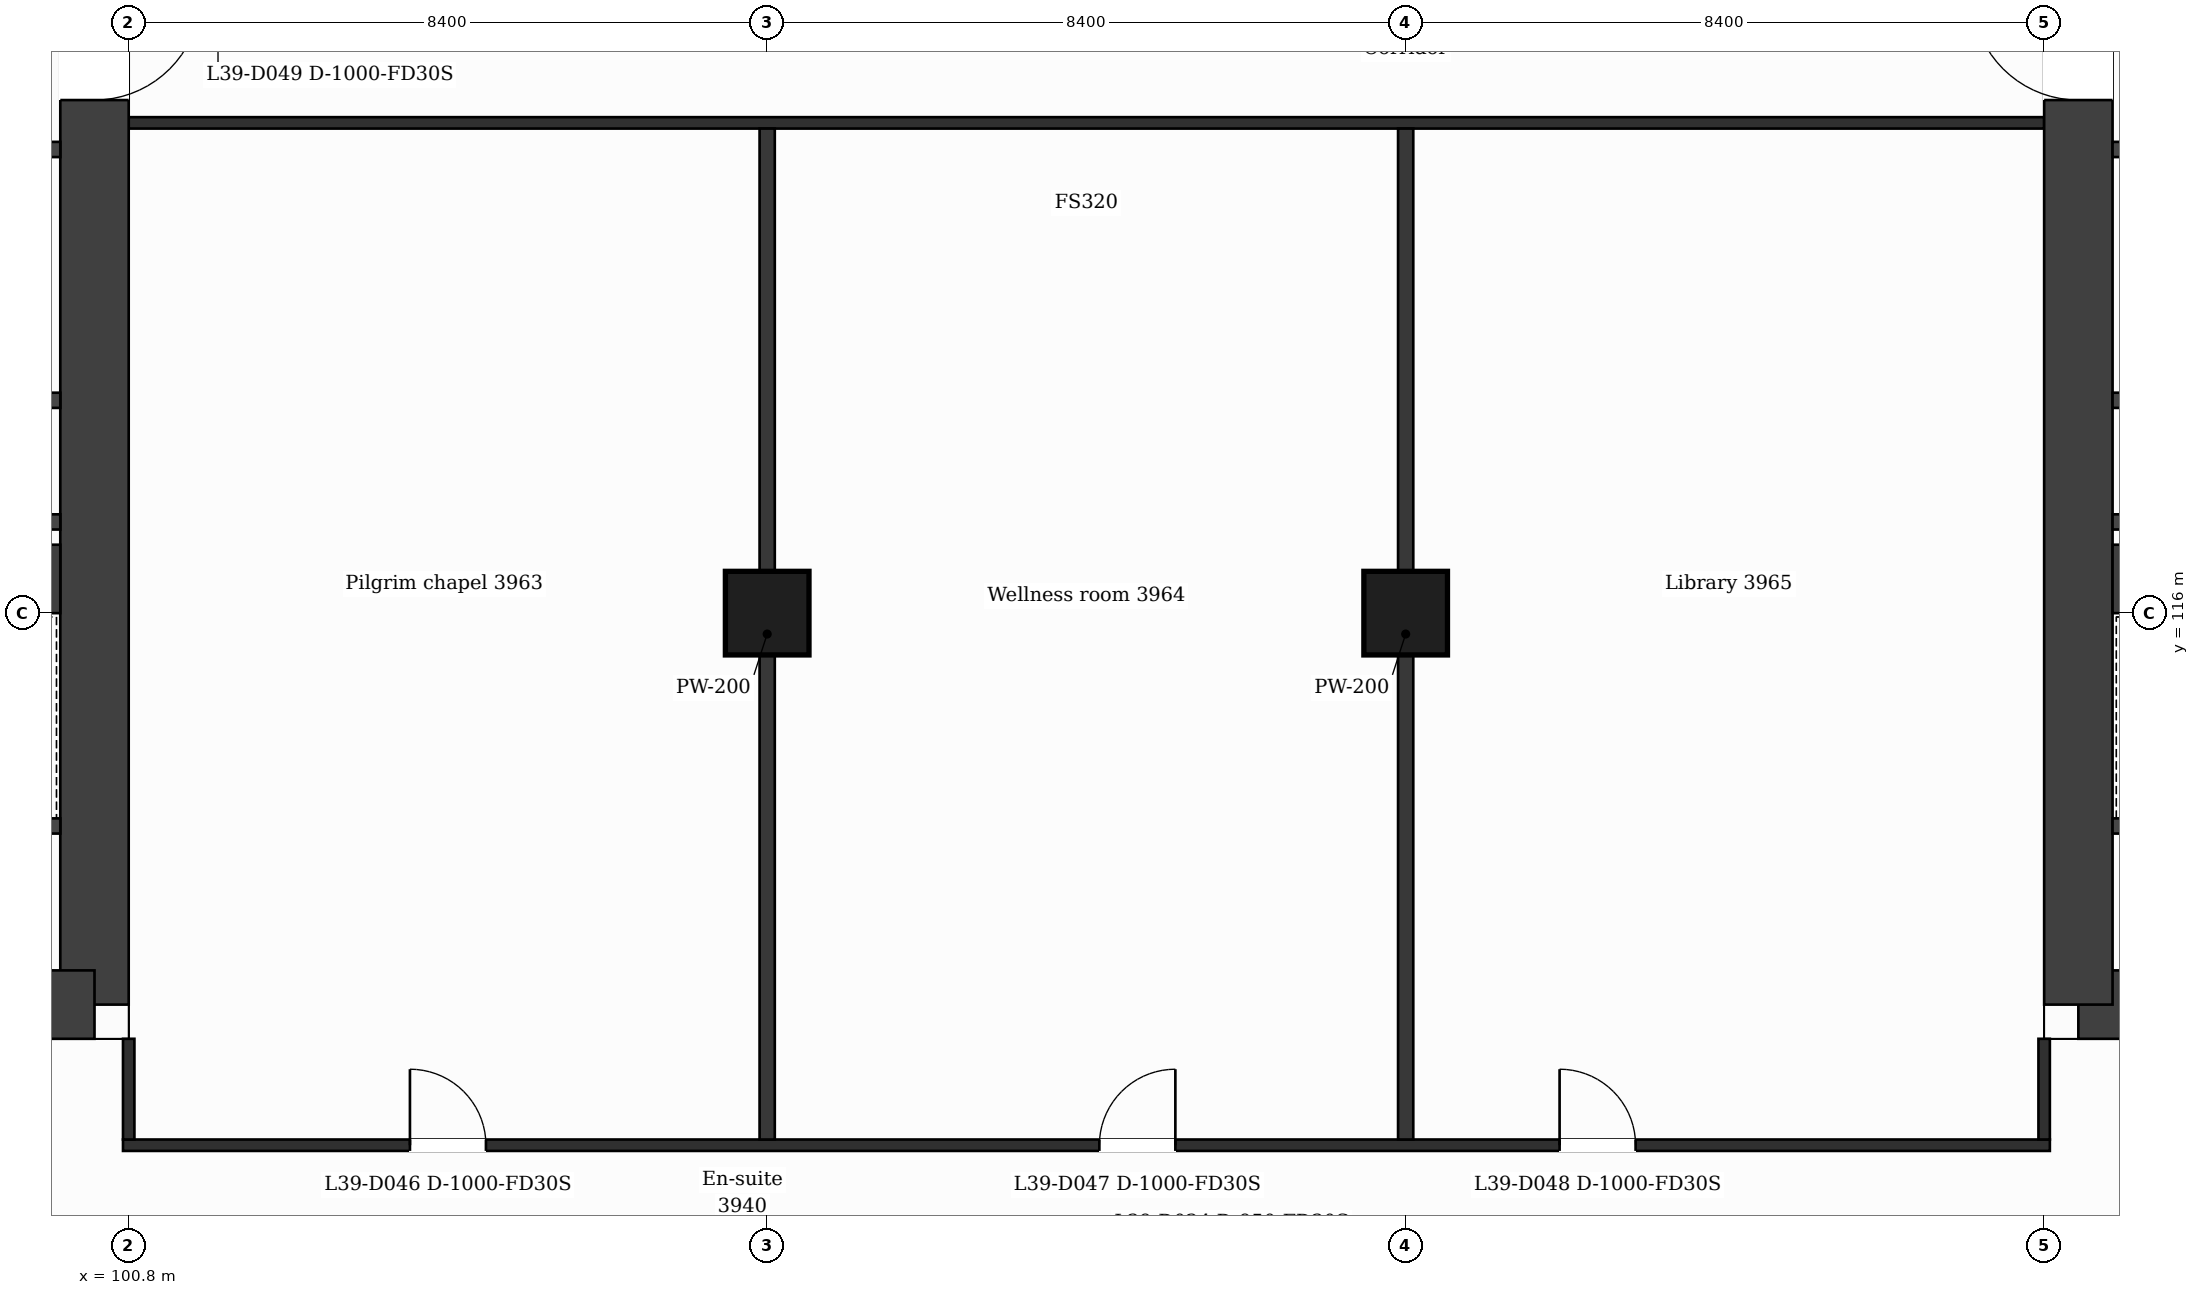
"""IFC4 building model, lengths in metres.
Left out: names, types, materials, properties, quantities, classifications, styles, units other than length and angle.
Written with IfcOpenShell. Run it as: python <this file> out.ifc"""

import sys

from ifc_helpers import new_model, si_unit, direction, frame, frame_2d, origin, origin_2d, place, context, subcontext, project, spatial, rectangle, extrude, element, fill, save


model = new_model("IFC4")
c1 = context("Model", 3, precision=1e-05, world=origin(), true_north=direction((0.0, 1.0)))
c2 = subcontext(c1, "Body", "Model", "MODEL_VIEW")
j1 = project(units=[si_unit("LENGTHUNIT", "METRE"), si_unit("PLANEANGLEUNIT", "RADIAN")], contexts=[c1])
p1 = place(None, origin())
s1 = spatial("IfcSite", under=j1, at=p1, CompositionType="ELEMENT")
p2 = place(p1, origin())
s2 = spatial("IfcBuilding", under=s1, at=p2, CompositionType="ELEMENT")
p3 = place(p2, frame((0.0, 0.0, 166.3)))
s3 = spatial("IfcBuildingStorey", under=s2, at=p3, CompositionType="ELEMENT", Elevation=166.3)
p4 = place(p3, frame((100.35, 131.95, 0.0), z_axis=(0.0, 0.0, 1.0), x_axis=(0.0, -1.0, 0.0)))
e1 = element("IfcWall", 1, at=p4, inside=s3, PredefinedType="SHEAR", context=c2, shape_type="SweptSolid", body=[
    extrude(rectangle(XDim=21.1, YDim=0.9, at=frame_2d((10.55, 0.0))), origin(), (0.0, 0.0, 1.0), 3.7),
])
p5 = place(p4, frame((7.8, 0.0, 0.0)))
e2 = element("IfcOpeningElement", 2, at=p5, cuts=e1, PredefinedType="OPENING", context=c2, shape_type="SweptSolid", body=[
    extrude(rectangle(XDim=1.4, YDim=2.1, at=frame_2d((0.7, 1.05))), frame((0.0, 0.46, 0.0), z_axis=(0.0, -1.0, 0.0), x_axis=(1.0, 0.0, 0.0)), (0.0, 0.0, 1.0), 0.92),
])
p6 = place(p3, frame((100.35, 110.85, 0.0), z_axis=(0.0, 0.0, 1.0), x_axis=(-1.0, 0.0, 0.0)))
e3 = element("IfcWall", 3, at=p6, inside=s3, PredefinedType="SHEAR", context=c2, shape_type="SweptSolid", body=[
    extrude(rectangle(XDim=14.166, YDim=0.9, at=frame_2d((7.083, 0.0))), origin(), (0.0, 0.0, 1.0), 3.7),
])
p7 = place(p6, frame((5.855, 0.0, 0.0)))
e4 = element("IfcOpeningElement", 4, at=p7, cuts=e3, PredefinedType="OPENING", context=c2, shape_type="SweptSolid", body=[
    extrude(rectangle(XDim=1.4, YDim=2.1, at=frame_2d((0.7, 1.05))), frame((0.0, 0.46, 0.0), z_axis=(0.0, -1.0, 0.0), x_axis=(1.0, 0.0, 0.0)), (0.0, 0.0, 1.0), 0.92),
])
p8 = place(p3, frame((94.8, 116.45, 0.0), z_axis=(0.0, 0.0, 1.0), x_axis=(1.0, 0.0, 0.0)))
e5 = element("IfcWall", 5, at=p8, inside=s3, PredefinedType="SHEAR", context=c2, shape_type="SweptSolid", body=[
    extrude(rectangle(XDim=5.1, YDim=0.9, at=frame_2d((2.55, 0.0))), origin(), (0.0, 0.0, 1.0), 3.7),
])
p9 = place(p3, frame((140.616, 110.85, 0.0), z_axis=(0.0, 0.0, 1.0), x_axis=(-1.0, 0.0, 0.0)))
e6 = element("IfcWall", 6, at=p9, inside=s3, PredefinedType="SHEAR", context=c2, shape_type="SweptSolid", body=[
    extrude(rectangle(XDim=14.166, YDim=0.9, at=frame_2d((7.083, 0.0))), origin(), (0.0, 0.0, 1.0), 3.7),
])
p10 = place(p9, frame((6.911, 0.0, 0.0)))
e7 = element("IfcOpeningElement", 7, at=p10, cuts=e6, PredefinedType="OPENING", context=c2, shape_type="SweptSolid", body=[
    extrude(rectangle(XDim=1.4, YDim=2.1, at=frame_2d((0.7, 1.05))), frame((0.0, 0.46, 0.0), z_axis=(0.0, -1.0, 0.0), x_axis=(1.0, 0.0, 0.0)), (0.0, 0.0, 1.0), 0.92),
])
p11 = place(p3, frame((126.45, 110.85, 0.0), z_axis=(0.0, 0.0, 1.0), x_axis=(0.0, 1.0, 0.0)))
e8 = element("IfcWall", 8, at=p11, inside=s3, PredefinedType="SHEAR", context=c2, shape_type="SweptSolid", body=[
    extrude(rectangle(XDim=21.1, YDim=0.9, at=frame_2d((10.55, 0.0))), origin(), (0.0, 0.0, 1.0), 3.7),
])
p12 = place(p11, frame((11.9, 0.0, 0.0)))
e9 = element("IfcOpeningElement", 9, at=p12, cuts=e8, PredefinedType="OPENING", context=c2, shape_type="SweptSolid", body=[
    extrude(rectangle(XDim=1.4, YDim=2.1, at=frame_2d((0.7, 1.05))), frame((0.0, 0.46, 0.0), z_axis=(0.0, -1.0, 0.0), x_axis=(1.0, 0.0, 0.0)), (0.0, 0.0, 1.0), 0.92),
])
p13 = place(p3, frame((126.9, 116.45, 0.0), z_axis=(0.0, 0.0, 1.0), x_axis=(1.0, 0.0, 0.0)))
e10 = element("IfcWall", 10, at=p13, inside=s3, PredefinedType="SHEAR", context=c2, shape_type="SweptSolid", body=[
    extrude(rectangle(XDim=5.1, YDim=0.9, at=frame_2d((2.55, 0.0))), origin(), (0.0, 0.0, 1.0), 3.7),
])
for number, where, z_axis, x_axis in (
    (11, (109.2, 116.0, 0.0), (0.0, 0.0, 1.0), (1.0, 0.0, 0.0)),
    (12, (117.6, 116.0, 0.0), (0.0, 0.0, 1.0), (1.0, 0.0, 0.0)),
):
    element("IfcColumn", number, at=place(p3, frame(where, z_axis=z_axis, x_axis=x_axis)), inside=s3, PredefinedType="COLUMN", context=c2, shape_type="SweptSolid", body=[
        extrude(rectangle(XDim=1.1, YDim=1.1, at=origin_2d()), origin(), (0.0, 0.0, 1.0), 3.7),
    ])
p14 = place(p3, frame((100.725, 109.0, 0.0), z_axis=(0.0, 0.0, 1.0), x_axis=(1.0, 0.0, 0.0)))
e13 = element("IfcWall", 13, at=p14, inside=s3, PredefinedType="PARTITIONING", context=c2, shape_type="SweptSolid", body=[
    extrude(rectangle(XDim=25.35, YDim=0.15, at=frame_2d((12.675, 0.0))), origin(), (0.0, 0.0, 1.0), 3.38),
])
p15 = place(p14, frame((3.775, 0.0, 0.0)))
e14 = element("IfcOpeningElement", 14, at=p15, cuts=e13, PredefinedType="OPENING", context=c2, shape_type="SweptSolid", body=[
    extrude(rectangle(XDim=1.0, YDim=2.1, at=frame_2d((0.5, 1.05))), frame((0.0, 0.085, 0.0), z_axis=(0.0, -1.0, 0.0), x_axis=(1.0, 0.0, 0.0)), (0.0, 0.0, 1.0), 0.17),
])
p16 = place(p14, frame((12.845, 0.0, 0.0)))
e15 = element("IfcOpeningElement", 15, at=p16, cuts=e13, PredefinedType="OPENING", context=c2, shape_type="SweptSolid", body=[
    extrude(rectangle(XDim=1.0, YDim=2.1, at=frame_2d((0.5, 1.05))), frame((0.0, 0.085, 0.0), z_axis=(0.0, -1.0, 0.0), x_axis=(1.0, 0.0, 0.0)), (0.0, 0.0, 1.0), 0.17),
])
p17 = place(p14, frame((18.9, 0.0, 0.0)))
e16 = element("IfcOpeningElement", 16, at=p17, cuts=e13, PredefinedType="OPENING", context=c2, shape_type="SweptSolid", body=[
    extrude(rectangle(XDim=1.0, YDim=2.1, at=frame_2d((0.5, 1.05))), frame((0.0, 0.085, 0.0), z_axis=(0.0, -1.0, 0.0), x_axis=(1.0, 0.0, 0.0)), (0.0, 0.0, 1.0), 0.17),
])
p18 = place(p3, frame((95.127, 113.2, 0.0), z_axis=(0.0, 0.0, 1.0), x_axis=(1.0, 0.0, 0.0)))
e17 = element("IfcWall", 17, at=p18, inside=s3, PredefinedType="PARTITIONING", context=c2, shape_type="SweptSolid", body=[
    extrude(rectangle(XDim=4.773, YDim=0.2, at=frame_2d((2.386, 0.0))), origin(), (0.0, 0.0, 1.0), 3.38),
])
p19 = place(p18, frame((2.921, 0.0, 0.0)))
e18 = element("IfcOpeningElement", 18, at=p19, cuts=e17, PredefinedType="OPENING", context=c2, shape_type="SweptSolid", body=[
    extrude(rectangle(XDim=1.1, YDim=2.1, at=frame_2d((0.55, 1.05))), frame((0.0, 0.11, 0.0), z_axis=(0.0, -1.0, 0.0), x_axis=(1.0, 0.0, 0.0)), (0.0, 0.0, 1.0), 0.22),
])
p20 = place(p3, frame((126.9, 113.2, 0.0), z_axis=(0.0, 0.0, 1.0), x_axis=(1.0, 0.0, 0.0)))
e19 = element("IfcWall", 19, at=p20, inside=s3, PredefinedType="PARTITIONING", context=c2, shape_type="SweptSolid", body=[
    extrude(rectangle(XDim=4.773, YDim=0.2, at=frame_2d((2.387, 0.0))), origin(), (0.0, 0.0, 1.0), 3.38),
])
p21 = place(p20, frame((0.618, 0.0, 0.0)))
e20 = element("IfcOpeningElement", 20, at=p21, cuts=e19, PredefinedType="OPENING", context=c2, shape_type="SweptSolid", body=[
    extrude(rectangle(XDim=1.1, YDim=2.1, at=frame_2d((0.55, 1.05))), frame((0.0, 0.11, 0.0), z_axis=(0.0, -1.0, 0.0), x_axis=(1.0, 0.0, 0.0)), (0.0, 0.0, 1.0), 0.22),
])
p22 = place(p3, frame((95.227, 117.2, 0.0), z_axis=(0.0, 0.0, 1.0), x_axis=(1.0, 0.0, 0.0)))
e21 = element("IfcWall", 21, at=p22, inside=s3, PredefinedType="PARTITIONING", context=c2, shape_type="SweptSolid", body=[
    extrude(rectangle(XDim=4.673, YDim=0.2, at=frame_2d((2.336, 0.0))), origin(), (0.0, 0.0, 1.0), 3.38),
])
p23 = place(p3, frame((126.9, 117.2, 0.0), z_axis=(0.0, 0.0, 1.0), x_axis=(1.0, 0.0, 0.0)))
e22 = element("IfcWall", 22, at=p23, inside=s3, PredefinedType="PARTITIONING", context=c2, shape_type="SweptSolid", body=[
    extrude(rectangle(XDim=4.673, YDim=0.2, at=frame_2d((2.336, 0.0))), origin(), (0.0, 0.0, 1.0), 3.38),
])
p24 = place(p3, frame((95.227, 118.8, 0.0), z_axis=(0.0, 0.0, 1.0), x_axis=(1.0, 0.0, 0.0)))
e23 = element("IfcWall", 23, at=p24, inside=s3, PredefinedType="PARTITIONING", context=c2, shape_type="SweptSolid", body=[
    extrude(rectangle(XDim=4.673, YDim=0.2, at=frame_2d((2.336, 0.0))), origin(), (0.0, 0.0, 1.0), 3.38),
])
p25 = place(p3, frame((126.9, 118.8, 0.0), z_axis=(0.0, 0.0, 1.0), x_axis=(1.0, 0.0, 0.0)))
e24 = element("IfcWall", 24, at=p25, inside=s3, PredefinedType="PARTITIONING", context=c2, shape_type="SweptSolid", body=[
    extrude(rectangle(XDim=4.673, YDim=0.2, at=frame_2d((2.336, 0.0))), origin(), (0.0, 0.0, 1.0), 3.38),
])
p26 = place(p3, frame((95.227, 122.1, 0.0), z_axis=(0.0, 0.0, 1.0), x_axis=(1.0, 0.0, 0.0)))
e25 = element("IfcWall", 25, at=p26, inside=s3, PredefinedType="PARTITIONING", context=c2, shape_type="SweptSolid", body=[
    extrude(rectangle(XDim=4.673, YDim=0.2, at=frame_2d((2.336, 0.0))), origin(), (0.0, 0.0, 1.0), 3.38),
])
p27 = place(p26, frame((2.655, 0.0, 0.0)))
e26 = element("IfcOpeningElement", 26, at=p27, cuts=e25, PredefinedType="OPENING", context=c2, shape_type="SweptSolid", body=[
    extrude(rectangle(XDim=0.9, YDim=2.1, at=frame_2d((0.45, 1.05))), frame((0.0, 0.11, 0.0), z_axis=(0.0, -1.0, 0.0), x_axis=(1.0, 0.0, 0.0)), (0.0, 0.0, 1.0), 0.22),
])
p28 = place(p3, frame((126.9, 122.1, 0.0), z_axis=(0.0, 0.0, 1.0), x_axis=(1.0, 0.0, 0.0)))
e27 = element("IfcWall", 27, at=p28, inside=s3, PredefinedType="PARTITIONING", context=c2, shape_type="SweptSolid", body=[
    extrude(rectangle(XDim=4.673, YDim=0.2, at=frame_2d((2.336, 0.0))), origin(), (0.0, 0.0, 1.0), 3.38),
])
p29 = place(p28, frame((2.655, 0.0, 0.0)))
e28 = element("IfcOpeningElement", 28, at=p29, cuts=e27, PredefinedType="OPENING", context=c2, shape_type="SweptSolid", body=[
    extrude(rectangle(XDim=0.9, YDim=2.1, at=frame_2d((0.45, 1.05))), frame((0.0, 0.11, 0.0), z_axis=(0.0, -1.0, 0.0), x_axis=(1.0, 0.0, 0.0)), (0.0, 0.0, 1.0), 0.22),
])
p30 = place(p3, frame((100.8, 122.45, 0.0), z_axis=(0.0, 0.0, 1.0), x_axis=(1.0, 0.0, 0.0)))
e29 = element("IfcWall", 29, at=p30, inside=s3, PredefinedType="PARTITIONING", context=c2, shape_type="SweptSolid", body=[
    extrude(rectangle(XDim=25.2, YDim=0.15, at=frame_2d((12.6, 0.0))), origin(), (0.0, 0.0, 1.0), 3.38),
])
p31 = place(p3, frame((100.8, 109.075, 0.0), z_axis=(0.0, 0.0, 1.0), x_axis=(0.0, 1.0, 0.0)))
e30 = element("IfcWall", 30, at=p31, inside=s3, PredefinedType="PARTITIONING", context=c2, shape_type="SweptSolid", body=[
    extrude(rectangle(XDim=1.325, YDim=0.15, at=frame_2d((0.663, 0.0))), origin(), (0.0, 0.0, 1.0), 3.38),
])
for number, where, z_axis, x_axis in (
    (31, (109.2, 109.075, 0.0), (0.0, 0.0, 1.0), (0.0, 1.0, 0.0)),
    (32, (117.6, 109.075, 0.0), (0.0, 0.0, 1.0), (0.0, 1.0, 0.0)),
):
    element("IfcWall", number, at=place(p3, frame(where, z_axis=z_axis, x_axis=x_axis)), inside=s3, PredefinedType="PARTITIONING", context=c2, shape_type="SweptSolid", body=[
        extrude(rectangle(XDim=13.3, YDim=0.2, at=frame_2d((6.65, 0.0))), origin(), (0.0, 0.0, 1.0), 3.38),
    ])
p32 = place(p3, frame((126.0, 109.075, 0.0), z_axis=(0.0, 0.0, 1.0), x_axis=(0.0, 1.0, 0.0)))
e33 = element("IfcWall", 33, at=p32, inside=s3, PredefinedType="PARTITIONING", context=c2, shape_type="SweptSolid", body=[
    extrude(rectangle(XDim=1.325, YDim=0.15, at=frame_2d((0.663, 0.0))), origin(), (0.0, 0.0, 1.0), 3.38),
])
p33 = place(p15, origin())
e34 = element("IfcDoor", 34, at=p33, inside=s3, OperationType="SINGLE_SWING_LEFT", PredefinedType="DOOR", context=c2, shape_type="SweptSolid", body=[
    extrude(rectangle(XDim=1.0, YDim=2.1, at=frame_2d((0.5, 1.05))), frame((0.0, 0.025, 0.0), z_axis=(0.0, -1.0, 0.0), x_axis=(1.0, 0.0, 0.0)), (0.0, 0.0, 1.0), 0.05),
])
fill(e14, e34)
p34 = place(p16, origin())
e35 = element("IfcDoor", 35, at=p34, inside=s3, OperationType="SINGLE_SWING_RIGHT", PredefinedType="DOOR", context=c2, shape_type="SweptSolid", body=[
    extrude(rectangle(XDim=1.0, YDim=2.1, at=frame_2d((0.5, 1.05))), frame((0.0, 0.025, 0.0), z_axis=(0.0, -1.0, 0.0), x_axis=(1.0, 0.0, 0.0)), (0.0, 0.0, 1.0), 0.05),
])
fill(e15, e35)
p35 = place(p17, origin())
e36 = element("IfcDoor", 36, at=p35, inside=s3, OperationType="SINGLE_SWING_LEFT", PredefinedType="DOOR", context=c2, shape_type="SweptSolid", body=[
    extrude(rectangle(XDim=1.0, YDim=2.1, at=frame_2d((0.5, 1.05))), frame((0.0, 0.025, 0.0), z_axis=(0.0, -1.0, 0.0), x_axis=(1.0, 0.0, 0.0)), (0.0, 0.0, 1.0), 0.05),
])
fill(e16, e36)
p36 = place(p5, origin())
e37 = element("IfcDoor", 37, at=p36, inside=s3, OperationType="SINGLE_SWING_LEFT", PredefinedType="DOOR", context=c2, shape_type="SweptSolid", body=[
    extrude(rectangle(XDim=1.4, YDim=2.1, at=frame_2d((0.7, 1.05))), frame((0.0, 0.025, 0.0), z_axis=(0.0, -1.0, 0.0), x_axis=(1.0, 0.0, 0.0)), (0.0, 0.0, 1.0), 0.05),
])
fill(e2, e37)
p37 = place(p12, origin())
e38 = element("IfcDoor", 38, at=p37, inside=s3, OperationType="SINGLE_SWING_RIGHT", PredefinedType="DOOR", context=c2, shape_type="SweptSolid", body=[
    extrude(rectangle(XDim=1.4, YDim=2.1, at=frame_2d((0.7, 1.05))), frame((0.0, 0.025, 0.0), z_axis=(0.0, -1.0, 0.0), x_axis=(1.0, 0.0, 0.0)), (0.0, 0.0, 1.0), 0.05),
])
fill(e9, e38)
save(model, sys.argv[1])
